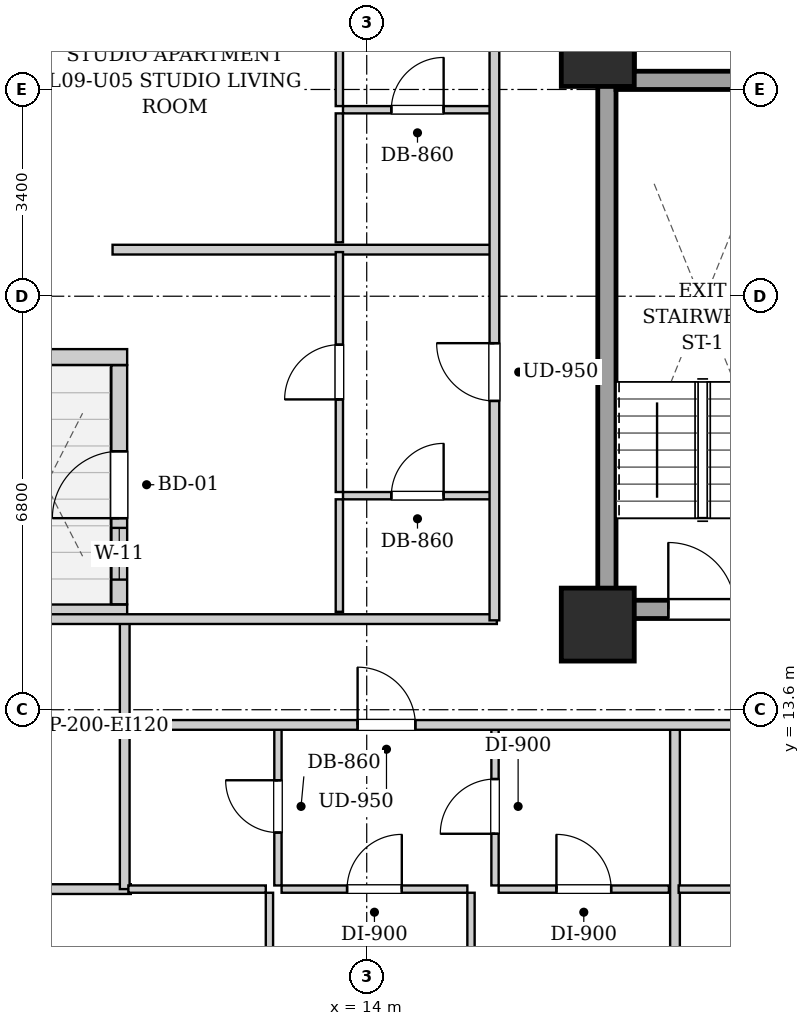
"""IFC4 building model, lengths in metres.
Left out: names, types, materials, properties, quantities, classifications, styles, units other than length and angle.
Written with IfcOpenShell. Run it as: python <this file> out.ifc"""

import sys

from ifc_helpers import new_model, si_unit, direction, frame, frame_2d, origin, origin_2d, place, context, subcontext, project, spatial, rectangle, extrude, element, fill, save


model = new_model("IFC4")
c1 = context("Model", 3, precision=1e-05, world=origin(), true_north=direction((0.0, 1.0)))
c2 = subcontext(c1, "Body", "Model", "MODEL_VIEW")
j1 = project(units=[si_unit("LENGTHUNIT", "METRE"), si_unit("PLANEANGLEUNIT", "RADIAN")], contexts=[c1])
p1 = place(None, origin())
s1 = spatial("IfcSite", under=j1, at=p1, CompositionType="ELEMENT")
p2 = place(p1, origin())
s2 = spatial("IfcBuilding", under=s1, at=p2, CompositionType="ELEMENT")
p3 = place(p2, frame((0.0, 0.0, 38.6)))
s3 = spatial("IfcBuildingStorey", under=s2, at=p3, CompositionType="ELEMENT", Elevation=38.6)
for number, where, z_axis, x_axis in (
    (1, (17.8, 15.0, 0.0), (0.0, 0.0, 1.0), (1.0, 0.0, 0.0)),
    (2, (17.8, 24.45, 0.0), (0.0, 0.0, 1.0), (1.0, 0.0, 0.0)),
):
    element("IfcColumn", number, at=place(p3, frame(where, z_axis=z_axis, x_axis=x_axis)), inside=s3, PredefinedType="COLUMN", context=c2, shape_type="SweptSolid", body=[
        extrude(rectangle(XDim=1.2, YDim=1.2, at=origin_2d()), origin(), (0.0, 0.0, 1.0), 3.2),
    ])
p4 = place(p3, frame((7.66, 15.2, 0.0), z_axis=(0.0, 0.0, 1.0), x_axis=(1.0, 0.0, 0.0)))
e3 = element("IfcWall", 3, at=p4, inside=s3, PredefinedType="SOLIDWALL", context=c2, shape_type="SweptSolid", body=[
    extrude(rectangle(XDim=2.4, YDim=0.26, at=frame_2d((1.2, 0.0))), origin(), (0.0, 0.0, 1.0), 2.94),
])
p5 = place(p3, frame((9.93, 15.334, 0.0), z_axis=(0.0, 0.0, 1.0), x_axis=(0.0, 1.0, 0.0)))
e4 = element("IfcWall", 4, at=p5, inside=s3, PredefinedType="SOLIDWALL", context=c2, shape_type="SweptSolid", body=[
    extrude(rectangle(XDim=3.932, YDim=0.26, at=frame_2d((1.966, 0.0))), origin(), (0.0, 0.0, 1.0), 2.94),
])
p6 = place(p5, frame((1.416, 0.0, 0.0)))
e5 = element("IfcOpeningElement", 5, at=p6, cuts=e4, PredefinedType="OPENING", context=c2, shape_type="SweptSolid", body=[
    extrude(rectangle(XDim=1.1, YDim=2.0, at=frame_2d((0.55, 1.0))), frame((0.0, 0.14, 0.0), z_axis=(0.0, -1.0, 0.0), x_axis=(1.0, 0.0, 0.0)), (0.0, 0.0, 1.0), 0.28),
])
p7 = place(p5, frame((0.406, 0.0, 0.55)))
e6 = element("IfcOpeningElement", 6, at=p7, cuts=e4, PredefinedType="OPENING", context=c2, shape_type="SweptSolid", body=[
    extrude(rectangle(XDim=0.85, YDim=1.2, at=frame_2d((0.425, 0.6))), frame((0.0, 0.14, 0.0), z_axis=(0.0, -1.0, 0.0), x_axis=(1.0, 0.0, 0.0)), (0.0, 0.0, 1.0), 0.28),
])
p8 = place(p3, frame((10.06, 19.4, 0.0), z_axis=(0.0, 0.0, 1.0), x_axis=(-1.0, 0.0, 0.0)))
e7 = element("IfcWall", 7, at=p8, inside=s3, PredefinedType="SOLIDWALL", context=c2, shape_type="SweptSolid", body=[
    extrude(rectangle(XDim=2.4, YDim=0.26, at=frame_2d((1.2, 0.0))), origin(), (0.0, 0.0, 1.0), 2.94),
])
p9 = place(p3, frame((17.95, 15.1, 0.0), z_axis=(0.0, 0.0, 1.0), x_axis=(0.0, 1.0, 0.0)))
e8 = element("IfcWall", 8, at=p9, inside=s3, PredefinedType="SHEAR", context=c2, shape_type="SweptSolid", body=[
    extrude(rectangle(XDim=9.0, YDim=0.3, at=frame_2d((4.5, 0.0))), origin(), (0.0, 0.0, 1.0), 2.94),
])
p10 = place(p3, frame((18.1, 23.95, 0.0), z_axis=(0.0, 0.0, 1.0), x_axis=(1.0, 0.0, 0.0)))
e9 = element("IfcWall", 9, at=p10, inside=s3, PredefinedType="SHEAR", context=c2, shape_type="SweptSolid", body=[
    extrude(rectangle(XDim=2.85, YDim=0.3, at=frame_2d((1.425, 0.0))), origin(), (0.0, 0.0, 1.0), 2.94),
])
p11 = place(p3, frame((18.1, 15.25, 0.0), z_axis=(0.0, 0.0, 1.0), x_axis=(1.0, 0.0, 0.0)))
e10 = element("IfcWall", 10, at=p11, inside=s3, PredefinedType="SHEAR", context=c2, shape_type="SweptSolid", body=[
    extrude(rectangle(XDim=2.85, YDim=0.3, at=frame_2d((1.425, 0.0))), origin(), (0.0, 0.0, 1.0), 2.94),
])
p12 = place(p11, frame((0.86, 0.0, 0.0)))
e11 = element("IfcOpeningElement", 11, at=p12, cuts=e10, PredefinedType="OPENING", context=c2, shape_type="SweptSolid", body=[
    extrude(rectangle(XDim=1.1, YDim=2.05, at=frame_2d((0.55, 1.025))), frame((0.0, 0.16, 0.0), z_axis=(0.0, -1.0, 0.0), x_axis=(1.0, 0.0, 0.0)), (0.0, 0.0, 1.0), 0.32),
])
p13 = place(p3, frame((18.29, 24.1, 0.0), z_axis=(0.0, 0.0, 1.0), x_axis=(0.0, 1.0, 0.0)))
e12 = element("IfcWall", 12, at=p13, inside=s3, PredefinedType="SHEAR", context=c2, shape_type="SweptSolid", body=[
    extrude(rectangle(XDim=4.14, YDim=0.22, at=frame_2d((2.07, 0.0))), origin(), (0.0, 0.0, 1.0), 2.94),
])
p14 = place(p3, frame((17.88, 24.12, 0.0), z_axis=(0.0, 0.0, 1.0), x_axis=(0.0, 1.0, 0.0)))
e13 = element("IfcWall", 13, at=p14, inside=s3, PredefinedType="PARTITIONING", context=c2, shape_type="SweptSolid", body=[
    extrude(rectangle(XDim=4.76, YDim=0.16, at=frame_2d((2.38, 0.0))), origin(), (0.0, 0.0, 1.0), 2.275),
])
p15 = place(p3, frame((10.02, 13.35, 0.0), z_axis=(0.0, 0.0, 1.0), x_axis=(0.0, 1.0, 0.0)))
e14 = element("IfcWall", 14, at=p15, inside=s3, PredefinedType="PARTITIONING", context=c2, shape_type="SweptSolid", body=[
    extrude(rectangle(XDim=1.74, YDim=0.16, at=frame_2d((0.87, 0.0))), origin(), (0.0, 0.0, 1.0), 2.94),
])
p16 = place(p3, frame((7.78, 15.09, 0.0), z_axis=(0.0, 0.0, 1.0), x_axis=(1.0, 0.0, 0.0)))
e15 = element("IfcWall", 15, at=p16, inside=s3, PredefinedType="PARTITIONING", context=c2, shape_type="SweptSolid", body=[
    extrude(rectangle(XDim=8.36, YDim=0.16, at=frame_2d((4.18, 0.0))), origin(), (0.0, 0.0, 1.0), 2.155),
])
p17 = place(p3, frame((7.78, 10.65, 0.0), z_axis=(0.0, 0.0, 1.0), x_axis=(1.0, 0.0, 0.0)))
e16 = element("IfcWall", 16, at=p17, inside=s3, PredefinedType="PARTITIONING", context=c2, shape_type="SweptSolid", body=[
    extrude(rectangle(XDim=2.34, YDim=0.16, at=frame_2d((1.17, 0.0))), origin(), (0.0, 0.0, 1.0), 2.94),
])
p18 = place(p3, frame((10.02, 10.65, 0.0), z_axis=(0.0, 0.0, 1.0), x_axis=(0.0, 1.0, 0.0)))
e17 = element("IfcWall", 17, at=p18, inside=s3, PredefinedType="PARTITIONING", context=c2, shape_type="SweptSolid", body=[
    extrude(rectangle(XDim=2.66, YDim=0.16, at=frame_2d((1.33, 0.0))), origin(), (0.0, 0.0, 1.0), 2.94),
])
p19 = place(p3, frame((12.54, 10.71, 0.0), z_axis=(0.0, 0.0, 1.0), x_axis=(0.0, 1.0, 0.0)))
e18 = element("IfcWall", 18, at=p19, inside=s3, PredefinedType="PARTITIONING", context=c2, shape_type="SweptSolid", body=[
    extrude(rectangle(XDim=2.6, YDim=0.12, at=frame_2d((1.3, 0.0))), origin(), (0.0, 0.0, 1.0), 2.94),
])
p20 = place(p19, frame((0.87, 0.0, 0.0)))
e19 = element("IfcOpeningElement", 19, at=p20, cuts=e18, PredefinedType="OPENING", context=c2, shape_type="SweptSolid", body=[
    extrude(rectangle(XDim=0.86, YDim=2.05, at=frame_2d((0.43, 1.025))), frame((0.0, 0.07, 0.0), z_axis=(0.0, -1.0, 0.0), x_axis=(1.0, 0.0, 0.0)), (0.0, 0.0, 1.0), 0.14),
])
p21 = place(p3, frame((10.08, 10.65, 0.0), z_axis=(0.0, 0.0, 1.0), x_axis=(1.0, 0.0, 0.0)))
e20 = element("IfcWall", 20, at=p21, inside=s3, PredefinedType="PARTITIONING", context=c2, shape_type="SweptSolid", body=[
    extrude(rectangle(XDim=2.26, YDim=0.12, at=frame_2d((1.13, 0.0))), origin(), (0.0, 0.0, 1.0), 2.94),
])
p22 = place(p3, frame((16.11, 10.71, 0.0), z_axis=(0.0, 0.0, 1.0), x_axis=(0.0, 1.0, 0.0)))
e21 = element("IfcWall", 21, at=p22, inside=s3, PredefinedType="PARTITIONING", context=c2, shape_type="SweptSolid", body=[
    extrude(rectangle(XDim=2.6, YDim=0.12, at=frame_2d((1.3, 0.0))), origin(), (0.0, 0.0, 1.0), 2.94),
])
p23 = place(p22, frame((0.85, 0.0, 0.0)))
e22 = element("IfcOpeningElement", 22, at=p23, cuts=e21, PredefinedType="OPENING", context=c2, shape_type="SweptSolid", body=[
    extrude(rectangle(XDim=0.9, YDim=2.05, at=frame_2d((0.45, 1.025))), frame((0.0, 0.07, 0.0), z_axis=(0.0, -1.0, 0.0), x_axis=(1.0, 0.0, 0.0)), (0.0, 0.0, 1.0), 0.14),
])
p24 = place(p3, frame((12.6, 10.65, 0.0), z_axis=(0.0, 0.0, 1.0), x_axis=(1.0, 0.0, 0.0)))
e23 = element("IfcWall", 23, at=p24, inside=s3, PredefinedType="PARTITIONING", context=c2, shape_type="SweptSolid", body=[
    extrude(rectangle(XDim=3.055, YDim=0.12, at=frame_2d((1.527, 0.0))), origin(), (0.0, 0.0, 1.0), 2.94),
])
p25 = place(p24, frame((1.077, 0.0, 0.0)))
e24 = element("IfcOpeningElement", 24, at=p25, cuts=e23, PredefinedType="OPENING", context=c2, shape_type="SweptSolid", body=[
    extrude(rectangle(XDim=0.9, YDim=2.05, at=frame_2d((0.45, 1.025))), frame((0.0, 0.07, 0.0), z_axis=(0.0, -1.0, 0.0), x_axis=(1.0, 0.0, 0.0)), (0.0, 0.0, 1.0), 0.14),
])
p26 = place(p3, frame((16.17, 10.65, 0.0), z_axis=(0.0, 0.0, 1.0), x_axis=(1.0, 0.0, 0.0)))
e25 = element("IfcWall", 25, at=p26, inside=s3, PredefinedType="PARTITIONING", context=c2, shape_type="SweptSolid", body=[
    extrude(rectangle(XDim=2.8, YDim=0.12, at=frame_2d((1.4, 0.0))), origin(), (0.0, 0.0, 1.0), 2.94),
])
p27 = place(p26, frame((0.95, 0.0, 0.0)))
e26 = element("IfcOpeningElement", 26, at=p27, cuts=e25, PredefinedType="OPENING", context=c2, shape_type="SweptSolid", body=[
    extrude(rectangle(XDim=0.9, YDim=2.05, at=frame_2d((0.45, 1.025))), frame((0.0, 0.07, 0.0), z_axis=(0.0, -1.0, 0.0), x_axis=(1.0, 0.0, 0.0)), (0.0, 0.0, 1.0), 0.14),
])
p28 = place(p3, frame((12.4, 2.43, 0.0), z_axis=(0.0, 0.0, 1.0), x_axis=(0.0, 1.0, 0.0)))
e27 = element("IfcWall", 27, at=p28, inside=s3, PredefinedType="PARTITIONING", context=c2, shape_type="SweptSolid", body=[
    extrude(rectangle(XDim=8.16, YDim=0.12, at=frame_2d((4.08, 0.0))), origin(), (0.0, 0.0, 1.0), 2.94),
])
p29 = place(p28, frame((3.63, 0.0, 0.0)))
e28 = element("IfcOpeningElement", 28, at=p29, cuts=e27, PredefinedType="OPENING", context=c2, shape_type="SweptSolid", body=[
    extrude(rectangle(XDim=0.9, YDim=2.05, at=frame_2d((0.45, 1.025))), frame((0.0, 0.07, 0.0), z_axis=(0.0, -1.0, 0.0), x_axis=(1.0, 0.0, 0.0)), (0.0, 0.0, 1.0), 0.14),
])
p30 = place(p3, frame((15.715, 2.43, 0.0), z_axis=(0.0, 0.0, 1.0), x_axis=(0.0, 1.0, 0.0)))
e29 = element("IfcWall", 29, at=p30, inside=s3, PredefinedType="PARTITIONING", context=c2, shape_type="SweptSolid", body=[
    extrude(rectangle(XDim=8.16, YDim=0.12, at=frame_2d((4.08, 0.0))), origin(), (0.0, 0.0, 1.0), 2.94),
])
p31 = place(p30, frame((3.63, 0.0, 0.0)))
e30 = element("IfcOpeningElement", 30, at=p31, cuts=e29, PredefinedType="OPENING", context=c2, shape_type="SweptSolid", body=[
    extrude(rectangle(XDim=0.9, YDim=2.05, at=frame_2d((0.45, 1.025))), frame((0.0, 0.07, 0.0), z_axis=(0.0, -1.0, 0.0), x_axis=(1.0, 0.0, 0.0)), (0.0, 0.0, 1.0), 0.14),
])
p32 = place(p3, frame((19.07, 0.28, 0.0), z_axis=(0.0, 0.0, 1.0), x_axis=(0.0, 1.0, 0.0)))
e31 = element("IfcWall", 31, at=p32, inside=s3, PredefinedType="PARTITIONING", context=c2, shape_type="SweptSolid", body=[
    extrude(rectangle(XDim=13.03, YDim=0.16, at=frame_2d((6.515, 0.0))), origin(), (0.0, 0.0, 1.0), 2.94),
])
p33 = place(p3, frame((19.13, 10.65, 0.0), z_axis=(0.0, 0.0, 1.0), x_axis=(1.0, 0.0, 0.0)))
e32 = element("IfcWall", 32, at=p33, inside=s3, PredefinedType="PARTITIONING", context=c2, shape_type="SweptSolid", body=[
    extrude(rectangle(XDim=2.4, YDim=0.12, at=frame_2d((1.2, 0.0))), origin(), (0.0, 0.0, 1.0), 2.94),
])
p34 = place(p3, frame((9.82, 21.166, 0.0), z_axis=(0.0, 0.0, 1.0), x_axis=(1.0, 0.0, 0.0)))
e33 = element("IfcWall", 33, at=p34, inside=s3, PredefinedType="PARTITIONING", context=c2, shape_type="SweptSolid", body=[
    extrude(rectangle(XDim=6.24, YDim=0.16, at=frame_2d((3.12, 0.0))), origin(), (0.0, 0.0, 1.0), 2.94),
])
p35 = place(p3, frame((13.61, 17.12, 0.0), z_axis=(0.0, 0.0, 1.0), x_axis=(1.0, 0.0, 0.0)))
e34 = element("IfcWall", 34, at=p35, inside=s3, PredefinedType="PARTITIONING", context=c2, shape_type="SweptSolid", body=[
    extrude(rectangle(XDim=2.45, YDim=0.12, at=frame_2d((1.225, 0.0))), origin(), (0.0, 0.0, 1.0), 2.94),
])
p36 = place(p35, frame((0.795, 0.0, 0.0)))
e35 = element("IfcOpeningElement", 35, at=p36, cuts=e34, PredefinedType="OPENING", context=c2, shape_type="SweptSolid", body=[
    extrude(rectangle(XDim=0.86, YDim=2.05, at=frame_2d((0.43, 1.025))), frame((0.0, 0.07, 0.0), z_axis=(0.0, -1.0, 0.0), x_axis=(1.0, 0.0, 0.0)), (0.0, 0.0, 1.0), 0.14),
])
p37 = place(p3, frame((13.55, 15.21, 0.0), z_axis=(0.0, 0.0, 1.0), x_axis=(0.0, 1.0, 0.0)))
e36 = element("IfcWall", 36, at=p37, inside=s3, PredefinedType="PARTITIONING", context=c2, shape_type="SweptSolid", body=[
    extrude(rectangle(XDim=1.85, YDim=0.12, at=frame_2d((0.925, 0.0))), origin(), (0.0, 0.0, 1.0), 2.94),
])
p38 = place(p3, frame((13.55, 17.18, 0.0), z_axis=(0.0, 0.0, 1.0), x_axis=(0.0, 1.0, 0.0)))
e37 = element("IfcWall", 37, at=p38, inside=s3, PredefinedType="PARTITIONING", context=c2, shape_type="SweptSolid", body=[
    extrude(rectangle(XDim=3.946, YDim=0.12, at=frame_2d((1.973, 0.0))), origin(), (0.0, 0.0, 1.0), 2.94),
])
p39 = place(p38, frame((1.523, 0.0, 0.0)))
e38 = element("IfcOpeningElement", 38, at=p39, cuts=e37, PredefinedType="OPENING", context=c2, shape_type="SweptSolid", body=[
    extrude(rectangle(XDim=0.9, YDim=2.05, at=frame_2d((0.45, 1.025))), frame((0.0, 0.07, 0.0), z_axis=(0.0, -1.0, 0.0), x_axis=(1.0, 0.0, 0.0)), (0.0, 0.0, 1.0), 0.14),
])
p40 = place(p3, frame((13.61, 23.467, 0.0), z_axis=(0.0, 0.0, 1.0), x_axis=(1.0, 0.0, 0.0)))
e39 = element("IfcWall", 39, at=p40, inside=s3, PredefinedType="PARTITIONING", context=c2, shape_type="SweptSolid", body=[
    extrude(rectangle(XDim=2.45, YDim=0.12, at=frame_2d((1.225, 0.0))), origin(), (0.0, 0.0, 1.0), 2.94),
])
p41 = place(p40, frame((0.795, 0.0, 0.0)))
e40 = element("IfcOpeningElement", 40, at=p41, cuts=e39, PredefinedType="OPENING", context=c2, shape_type="SweptSolid", body=[
    extrude(rectangle(XDim=0.86, YDim=2.05, at=frame_2d((0.43, 1.025))), frame((0.0, 0.07, 0.0), z_axis=(0.0, -1.0, 0.0), x_axis=(1.0, 0.0, 0.0)), (0.0, 0.0, 1.0), 0.14),
])
p42 = place(p3, frame((13.55, 21.286, 0.0), z_axis=(0.0, 0.0, 1.0), x_axis=(0.0, 1.0, 0.0)))
e41 = element("IfcWall", 41, at=p42, inside=s3, PredefinedType="PARTITIONING", context=c2, shape_type="SweptSolid", body=[
    extrude(rectangle(XDim=2.121, YDim=0.12, at=frame_2d((1.061, 0.0))), origin(), (0.0, 0.0, 1.0), 2.94),
])
p43 = place(p3, frame((13.55, 23.527, 0.0), z_axis=(0.0, 0.0, 1.0), x_axis=(0.0, 1.0, 0.0)))
e42 = element("IfcWall", 42, at=p43, inside=s3, PredefinedType="PARTITIONING", context=c2, shape_type="SweptSolid", body=[
    extrude(rectangle(XDim=5.333, YDim=0.12, at=frame_2d((2.667, 0.0))), origin(), (0.0, 0.0, 1.0), 2.94),
])
p44 = place(p43, frame((2.216, 0.0, 0.0)))
e43 = element("IfcOpeningElement", 43, at=p44, cuts=e42, PredefinedType="OPENING", context=c2, shape_type="SweptSolid", body=[
    extrude(rectangle(XDim=0.9, YDim=2.05, at=frame_2d((0.45, 1.025))), frame((0.0, 0.07, 0.0), z_axis=(0.0, -1.0, 0.0), x_axis=(1.0, 0.0, 0.0)), (0.0, 0.0, 1.0), 0.14),
])
p45 = place(p3, frame((10.05, 13.35, 0.0), z_axis=(0.0, 0.0, 1.0), x_axis=(1.0, 0.0, 0.0)))
e44 = element("IfcWall", 44, at=p45, inside=s3, PredefinedType="PARTITIONING", context=c2, shape_type="SweptSolid", body=[
    extrude(rectangle(XDim=33.9, YDim=0.16, at=frame_2d((16.95, 0.0))), origin(), (0.0, 0.0, 1.0), 2.94),
])
p46 = place(p45, frame((3.8, 0.0, 0.0)))
e45 = element("IfcOpeningElement", 45, at=p46, cuts=e44, PredefinedType="OPENING", context=c2, shape_type="SweptSolid", body=[
    extrude(rectangle(XDim=0.95, YDim=2.1, at=frame_2d((0.475, 1.05))), frame((0.0, 0.09, 0.0), z_axis=(0.0, -1.0, 0.0), x_axis=(1.0, 0.0, 0.0)), (0.0, 0.0, 1.0), 0.18),
])
p47 = place(p45, frame((13.345, 0.0, 0.0)))
e46 = element("IfcOpeningElement", 46, at=p47, cuts=e44, PredefinedType="OPENING", context=c2, shape_type="SweptSolid", body=[
    extrude(rectangle(XDim=0.95, YDim=2.1, at=frame_2d((0.475, 1.05))), frame((0.0, 0.09, 0.0), z_axis=(0.0, -1.0, 0.0), x_axis=(1.0, 0.0, 0.0)), (0.0, 0.0, 1.0), 0.18),
])
p48 = place(p3, frame((16.1, 15.07, 0.0), z_axis=(0.0, 0.0, 1.0), x_axis=(0.0, 1.0, 0.0)))
e47 = element("IfcWall", 47, at=p48, inside=s3, PredefinedType="PARTITIONING", context=c2, shape_type="SweptSolid", body=[
    extrude(rectangle(XDim=13.93, YDim=0.16, at=frame_2d((6.965, 0.0))), origin(), (0.0, 0.0, 1.0), 2.94),
])
p49 = place(p48, frame((3.608, 0.0, 0.0)))
e48 = element("IfcOpeningElement", 48, at=p49, cuts=e47, PredefinedType="OPENING", context=c2, shape_type="SweptSolid", body=[
    extrude(rectangle(XDim=0.95, YDim=2.1, at=frame_2d((0.475, 1.05))), frame((0.0, 0.09, 0.0), z_axis=(0.0, -1.0, 0.0), x_axis=(1.0, 0.0, 0.0)), (0.0, 0.0, 1.0), 0.18),
])
p50 = place(p48, frame((10.649, 0.0, 0.0)))
e49 = element("IfcOpeningElement", 49, at=p50, cuts=e47, PredefinedType="OPENING", context=c2, shape_type="SweptSolid", body=[
    extrude(rectangle(XDim=0.95, YDim=2.1, at=frame_2d((0.475, 1.05))), frame((0.0, 0.09, 0.0), z_axis=(0.0, -1.0, 0.0), x_axis=(1.0, 0.0, 0.0)), (0.0, 0.0, 1.0), 0.18),
])
p51 = place(p12, origin())
e50 = element("IfcDoor", 50, at=p51, inside=s3, OperationType="SINGLE_SWING_LEFT", PredefinedType="DOOR", context=c2, shape_type="SweptSolid", body=[
    extrude(rectangle(XDim=1.1, YDim=2.05, at=frame_2d((0.55, 1.025))), frame((0.0, 0.025, 0.0), z_axis=(0.0, -1.0, 0.0), x_axis=(1.0, 0.0, 0.0)), (0.0, 0.0, 1.0), 0.05),
])
fill(e11, e50)
p52 = place(p20, origin())
e51 = element("IfcDoor", 51, at=p52, inside=s3, OperationType="SINGLE_SWING_RIGHT", PredefinedType="DOOR", context=c2, shape_type="SweptSolid", body=[
    extrude(rectangle(XDim=0.86, YDim=2.05, at=frame_2d((0.43, 1.025))), frame((0.0, 0.025, 0.0), z_axis=(0.0, -1.0, 0.0), x_axis=(1.0, 0.0, 0.0)), (0.0, 0.0, 1.0), 0.05),
])
fill(e19, e51)
p53 = place(p23, origin())
e52 = element("IfcDoor", 52, at=p53, inside=s3, OperationType="SINGLE_SWING_LEFT", PredefinedType="DOOR", context=c2, shape_type="SweptSolid", body=[
    extrude(rectangle(XDim=0.9, YDim=2.05, at=frame_2d((0.45, 1.025))), frame((0.0, 0.025, 0.0), z_axis=(0.0, -1.0, 0.0), x_axis=(1.0, 0.0, 0.0)), (0.0, 0.0, 1.0), 0.05),
])
fill(e22, e52)
p54 = place(p25, origin())
e53 = element("IfcDoor", 53, at=p54, inside=s3, OperationType="SINGLE_SWING_RIGHT", PredefinedType="DOOR", context=c2, shape_type="SweptSolid", body=[
    extrude(rectangle(XDim=0.9, YDim=2.05, at=frame_2d((0.45, 1.025))), frame((0.0, 0.025, 0.0), z_axis=(0.0, -1.0, 0.0), x_axis=(1.0, 0.0, 0.0)), (0.0, 0.0, 1.0), 0.05),
])
fill(e24, e53)
p55 = place(p27, origin())
e54 = element("IfcDoor", 54, at=p55, inside=s3, OperationType="SINGLE_SWING_LEFT", PredefinedType="DOOR", context=c2, shape_type="SweptSolid", body=[
    extrude(rectangle(XDim=0.9, YDim=2.05, at=frame_2d((0.45, 1.025))), frame((0.0, 0.025, 0.0), z_axis=(0.0, -1.0, 0.0), x_axis=(1.0, 0.0, 0.0)), (0.0, 0.0, 1.0), 0.05),
])
fill(e26, e54)
p56 = place(p36, origin())
e55 = element("IfcDoor", 55, at=p56, inside=s3, OperationType="SINGLE_SWING_RIGHT", PredefinedType="DOOR", context=c2, shape_type="SweptSolid", body=[
    extrude(rectangle(XDim=0.86, YDim=2.05, at=frame_2d((0.43, 1.025))), frame((0.0, 0.025, 0.0), z_axis=(0.0, -1.0, 0.0), x_axis=(1.0, 0.0, 0.0)), (0.0, 0.0, 1.0), 0.05),
])
fill(e35, e55)
p57 = place(p39, origin())
e56 = element("IfcDoor", 56, at=p57, inside=s3, OperationType="SINGLE_SWING_LEFT", PredefinedType="DOOR", context=c2, shape_type="SweptSolid", body=[
    extrude(rectangle(XDim=0.9, YDim=2.05, at=frame_2d((0.45, 1.025))), frame((0.0, 0.025, 0.0), z_axis=(0.0, -1.0, 0.0), x_axis=(1.0, 0.0, 0.0)), (0.0, 0.0, 1.0), 0.05),
])
fill(e38, e56)
p58 = place(p41, origin())
e57 = element("IfcDoor", 57, at=p58, inside=s3, OperationType="SINGLE_SWING_RIGHT", PredefinedType="DOOR", context=c2, shape_type="SweptSolid", body=[
    extrude(rectangle(XDim=0.86, YDim=2.05, at=frame_2d((0.43, 1.025))), frame((0.0, 0.025, 0.0), z_axis=(0.0, -1.0, 0.0), x_axis=(1.0, 0.0, 0.0)), (0.0, 0.0, 1.0), 0.05),
])
fill(e40, e57)
p59 = place(p46, origin())
e58 = element("IfcDoor", 58, at=p59, inside=s3, OperationType="SINGLE_SWING_LEFT", PredefinedType="DOOR", context=c2, shape_type="SweptSolid", body=[
    extrude(rectangle(XDim=0.95, YDim=2.1, at=frame_2d((0.475, 1.05))), frame((0.0, 0.025, 0.0), z_axis=(0.0, -1.0, 0.0), x_axis=(1.0, 0.0, 0.0)), (0.0, 0.0, 1.0), 0.05),
])
fill(e45, e58)
p60 = place(p49, origin())
e59 = element("IfcDoor", 59, at=p60, inside=s3, OperationType="SINGLE_SWING_RIGHT", PredefinedType="DOOR", context=c2, shape_type="SweptSolid", body=[
    extrude(rectangle(XDim=0.95, YDim=2.1, at=frame_2d((0.475, 1.05))), frame((0.0, 0.025, 0.0), z_axis=(0.0, -1.0, 0.0), x_axis=(1.0, 0.0, 0.0)), (0.0, 0.0, 1.0), 0.05),
])
fill(e48, e59)
p61 = place(p6, origin())
e60 = element("IfcDoor", 60, at=p61, inside=s3, OperationType="SINGLE_SWING_LEFT", PredefinedType="DOOR", context=c2, shape_type="SweptSolid", body=[
    extrude(rectangle(XDim=1.1, YDim=2.0, at=frame_2d((0.55, 1.0))), frame((0.0, 0.025, 0.0), z_axis=(0.0, -1.0, 0.0), x_axis=(1.0, 0.0, 0.0)), (0.0, 0.0, 1.0), 0.05),
])
fill(e5, e60)
p62 = place(p7, origin())
e61 = element("IfcWindow", 61, at=p62, inside=s3, PartitioningType="SINGLE_PANEL", PredefinedType="WINDOW", context=c2, shape_type="SweptSolid", body=[
    extrude(rectangle(XDim=0.85, YDim=1.2, at=frame_2d((0.425, 0.6))), frame((0.0, 0.03, 0.0), z_axis=(0.0, -1.0, 0.0), x_axis=(1.0, 0.0, 0.0)), (0.0, 0.0, 1.0), 0.06),
])
fill(e6, e61)
save(model, sys.argv[1])
